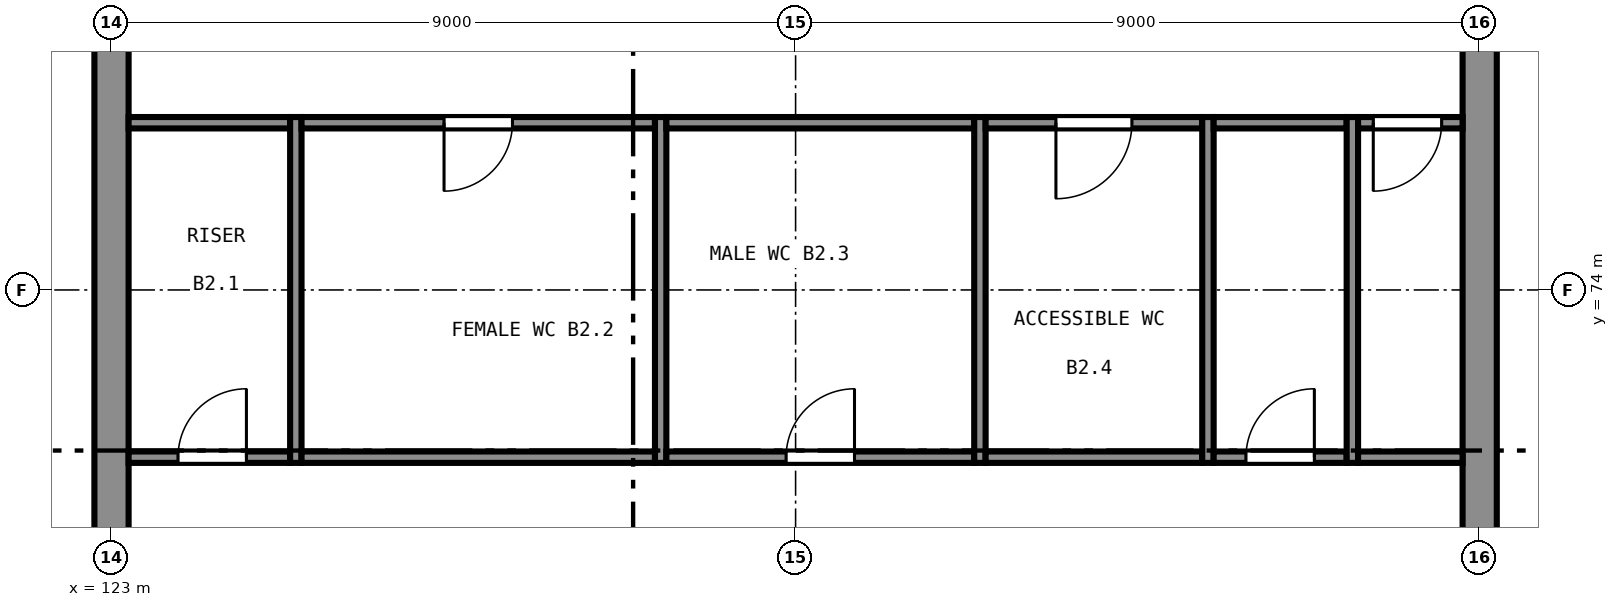
"""IFC4 building model, lengths in metres.
Left out: names, types, materials, properties, quantities, classifications, styles, units other than length and angle.
Written with IfcOpenShell. Run it as: python <this file> out.ifc"""

import sys

from ifc_helpers import new_model, si_unit, direction, frame, frame_2d, origin, place, context, subcontext, project, spatial, rectangle, extrude, element, fill, save


model = new_model("IFC4")
c1 = context("Model", 3, precision=1e-05, world=origin(), true_north=direction((0.0, 1.0)))
c2 = subcontext(c1, "Body", "Model", "MODEL_VIEW")
j1 = project(units=[si_unit("LENGTHUNIT", "METRE"), si_unit("PLANEANGLEUNIT", "RADIAN")], contexts=[c1])
p1 = place(None, origin())
s1 = spatial("IfcSite", under=j1, at=p1, CompositionType="ELEMENT")
p2 = place(p1, origin())
s2 = spatial("IfcBuilding", under=s1, at=p2, CompositionType="ELEMENT")
p3 = place(p2, frame((0.0, 0.0, -10.0)))
s3 = spatial("IfcBuildingStorey", under=s2, at=p3, CompositionType="ELEMENT", Elevation=-10.0)
p4 = place(p3, frame((141.0, 65.225, 0.0), z_axis=(0.0, 0.0, 1.0), x_axis=(0.0, 1.0, 0.0)))
e1 = element("IfcWall", 1, at=p4, inside=s3, PredefinedType="SHEAR", context=c2, shape_type="SweptSolid", body=[
    extrude(rectangle(XDim=17.55, YDim=0.45, at=frame_2d((8.775, 0.0))), origin(), (0.0, 0.0, 1.0), 5.0),
])
p5 = place(p4, frame((4.3, 0.0, 0.0)))
e2 = element("IfcOpeningElement", 2, at=p5, cuts=e1, PredefinedType="OPENING", context=c2, shape_type="SweptSolid", body=[
    extrude(rectangle(XDim=1.2, YDim=2.1, at=frame_2d((0.6, 1.05))), frame((0.0, 0.235, 0.0), z_axis=(0.0, -1.0, 0.0), x_axis=(1.0, 0.0, 0.0)), (0.0, 0.0, 1.0), 0.47),
])
p6 = place(p4, frame((12.05, 0.0, 0.0)))
e3 = element("IfcOpeningElement", 3, at=p6, cuts=e1, PredefinedType="OPENING", context=c2, shape_type="SweptSolid", body=[
    extrude(rectangle(XDim=1.2, YDim=2.1, at=frame_2d((0.6, 1.05))), frame((0.0, 0.235, 0.0), z_axis=(0.0, -1.0, 0.0), x_axis=(1.0, 0.0, 0.0)), (0.0, 0.0, 1.0), 0.47),
])
p7 = place(p3, frame((123.0, 82.775, 0.0), z_axis=(0.0, 0.0, 1.0), x_axis=(0.0, -1.0, 0.0)))
e4 = element("IfcWall", 4, at=p7, inside=s3, PredefinedType="SHEAR", context=c2, shape_type="SweptSolid", body=[
    extrude(rectangle(XDim=17.55, YDim=0.45, at=frame_2d((8.775, 0.0))), origin(), (0.0, 0.0, 1.0), 5.0),
])
p8 = place(p7, frame((12.05, 0.0, 0.0)))
e5 = element("IfcOpeningElement", 5, at=p8, cuts=e4, PredefinedType="OPENING", context=c2, shape_type="SweptSolid", body=[
    extrude(rectangle(XDim=1.2, YDim=2.1, at=frame_2d((0.6, 1.05))), frame((0.0, 0.235, 0.0), z_axis=(0.0, -1.0, 0.0), x_axis=(1.0, 0.0, 0.0)), (0.0, 0.0, 1.0), 0.47),
])
p9 = place(p7, frame((4.3, 0.0, 0.0)))
e6 = element("IfcOpeningElement", 6, at=p9, cuts=e4, PredefinedType="OPENING", context=c2, shape_type="SweptSolid", body=[
    extrude(rectangle(XDim=1.2, YDim=2.1, at=frame_2d((0.6, 1.05))), frame((0.0, 0.235, 0.0), z_axis=(0.0, -1.0, 0.0), x_axis=(1.0, 0.0, 0.0)), (0.0, 0.0, 1.0), 0.47),
])
p10 = place(p3, frame((125.425, 71.725, 0.0), z_axis=(0.0, 0.0, 1.0), x_axis=(0.0, 1.0, 0.0)))
e7 = element("IfcWall", 7, at=p10, inside=s3, PredefinedType="PARTITIONING", context=c2, shape_type="SweptSolid", body=[
    extrude(rectangle(XDim=4.55, YDim=0.15, at=frame_2d((2.275, 0.0))), origin(), (0.0, 0.0, 1.0), 4.7),
])
p11 = place(p3, frame((123.225, 71.8, 0.0), z_axis=(0.0, 0.0, 1.0), x_axis=(1.0, 0.0, 0.0)))
e8 = element("IfcWall", 8, at=p11, inside=s3, PredefinedType="PARTITIONING", context=c2, shape_type="SweptSolid", body=[
    extrude(rectangle(XDim=2.125, YDim=0.15, at=frame_2d((1.062, 0.0))), origin(), (0.0, 0.0, 1.0), 4.7),
])
p12 = place(p11, frame((0.65, 0.0, 0.0)))
e9 = element("IfcOpeningElement", 9, at=p12, cuts=e8, PredefinedType="OPENING", context=c2, shape_type="SweptSolid", body=[
    extrude(rectangle(XDim=0.9, YDim=2.1, at=frame_2d((0.45, 1.05))), frame((0.0, 0.085, 0.0), z_axis=(0.0, -1.0, 0.0), x_axis=(1.0, 0.0, 0.0)), (0.0, 0.0, 1.0), 0.17),
])
p13 = place(p3, frame((123.225, 76.2, 0.0), z_axis=(0.0, 0.0, 1.0), x_axis=(1.0, 0.0, 0.0)))
e10 = element("IfcWall", 10, at=p13, inside=s3, PredefinedType="PARTITIONING", context=c2, shape_type="SweptSolid", body=[
    extrude(rectangle(XDim=2.125, YDim=0.15, at=frame_2d((1.062, 0.0))), origin(), (0.0, 0.0, 1.0), 4.7),
])
p14 = place(p3, frame((130.225, 71.725, 0.0), z_axis=(0.0, 0.0, 1.0), x_axis=(0.0, 1.0, 0.0)))
e11 = element("IfcWall", 11, at=p14, inside=s3, PredefinedType="PARTITIONING", context=c2, shape_type="SweptSolid", body=[
    extrude(rectangle(XDim=4.55, YDim=0.15, at=frame_2d((2.275, 0.0))), origin(), (0.0, 0.0, 1.0), 4.7),
])
p15 = place(p3, frame((125.5, 71.8, 0.0), z_axis=(0.0, 0.0, 1.0), x_axis=(1.0, 0.0, 0.0)))
e12 = element("IfcWall", 12, at=p15, inside=s3, PredefinedType="PARTITIONING", context=c2, shape_type="SweptSolid", body=[
    extrude(rectangle(XDim=4.65, YDim=0.15, at=frame_2d((2.325, 0.0))), origin(), (0.0, 0.0, 1.0), 4.7),
])
p16 = place(p3, frame((125.5, 76.2, 0.0), z_axis=(0.0, 0.0, 1.0), x_axis=(1.0, 0.0, 0.0)))
e13 = element("IfcWall", 13, at=p16, inside=s3, PredefinedType="PARTITIONING", context=c2, shape_type="SweptSolid", body=[
    extrude(rectangle(XDim=4.65, YDim=0.15, at=frame_2d((2.325, 0.0))), origin(), (0.0, 0.0, 1.0), 4.7),
])
p17 = place(p16, frame((1.875, 0.0, 0.0)))
e14 = element("IfcOpeningElement", 14, at=p17, cuts=e13, PredefinedType="OPENING", context=c2, shape_type="SweptSolid", body=[
    extrude(rectangle(XDim=0.9, YDim=2.1, at=frame_2d((0.45, 1.05))), frame((0.0, 0.085, 0.0), z_axis=(0.0, -1.0, 0.0), x_axis=(1.0, 0.0, 0.0)), (0.0, 0.0, 1.0), 0.17),
])
p18 = place(p3, frame((134.425, 71.725, 0.0), z_axis=(0.0, 0.0, 1.0), x_axis=(0.0, 1.0, 0.0)))
e15 = element("IfcWall", 15, at=p18, inside=s3, PredefinedType="PARTITIONING", context=c2, shape_type="SweptSolid", body=[
    extrude(rectangle(XDim=4.55, YDim=0.15, at=frame_2d((2.275, 0.0))), origin(), (0.0, 0.0, 1.0), 4.7),
])
p19 = place(p3, frame((130.3, 71.8, 0.0), z_axis=(0.0, 0.0, 1.0), x_axis=(1.0, 0.0, 0.0)))
e16 = element("IfcWall", 16, at=p19, inside=s3, PredefinedType="PARTITIONING", context=c2, shape_type="SweptSolid", body=[
    extrude(rectangle(XDim=4.05, YDim=0.15, at=frame_2d((2.025, 0.0))), origin(), (0.0, 0.0, 1.0), 4.7),
])
p20 = place(p19, frame((1.575, 0.0, 0.0)))
e17 = element("IfcOpeningElement", 17, at=p20, cuts=e16, PredefinedType="OPENING", context=c2, shape_type="SweptSolid", body=[
    extrude(rectangle(XDim=0.9, YDim=2.1, at=frame_2d((0.45, 1.05))), frame((0.0, 0.085, 0.0), z_axis=(0.0, -1.0, 0.0), x_axis=(1.0, 0.0, 0.0)), (0.0, 0.0, 1.0), 0.17),
])
p21 = place(p3, frame((130.3, 76.2, 0.0), z_axis=(0.0, 0.0, 1.0), x_axis=(1.0, 0.0, 0.0)))
e18 = element("IfcWall", 18, at=p21, inside=s3, PredefinedType="PARTITIONING", context=c2, shape_type="SweptSolid", body=[
    extrude(rectangle(XDim=4.05, YDim=0.15, at=frame_2d((2.025, 0.0))), origin(), (0.0, 0.0, 1.0), 4.7),
])
p22 = place(p3, frame((137.425, 71.725, 0.0), z_axis=(0.0, 0.0, 1.0), x_axis=(0.0, 1.0, 0.0)))
e19 = element("IfcWall", 19, at=p22, inside=s3, PredefinedType="PARTITIONING", context=c2, shape_type="SweptSolid", body=[
    extrude(rectangle(XDim=4.55, YDim=0.15, at=frame_2d((2.275, 0.0))), origin(), (0.0, 0.0, 1.0), 4.7),
])
p23 = place(p3, frame((134.5, 71.8, 0.0), z_axis=(0.0, 0.0, 1.0), x_axis=(1.0, 0.0, 0.0)))
e20 = element("IfcWall", 20, at=p23, inside=s3, PredefinedType="PARTITIONING", context=c2, shape_type="SweptSolid", body=[
    extrude(rectangle(XDim=2.85, YDim=0.15, at=frame_2d((1.425, 0.0))), origin(), (0.0, 0.0, 1.0), 4.7),
])
p24 = place(p3, frame((134.5, 76.2, 0.0), z_axis=(0.0, 0.0, 1.0), x_axis=(1.0, 0.0, 0.0)))
e21 = element("IfcWall", 21, at=p24, inside=s3, PredefinedType="PARTITIONING", context=c2, shape_type="SweptSolid", body=[
    extrude(rectangle(XDim=2.85, YDim=0.15, at=frame_2d((1.425, 0.0))), origin(), (0.0, 0.0, 1.0), 4.7),
])
p25 = place(p24, frame((0.925, 0.0, 0.0)))
e22 = element("IfcOpeningElement", 22, at=p25, cuts=e21, PredefinedType="OPENING", context=c2, shape_type="SweptSolid", body=[
    extrude(rectangle(XDim=1.0, YDim=2.1, at=frame_2d((0.5, 1.05))), frame((0.0, 0.085, 0.0), z_axis=(0.0, -1.0, 0.0), x_axis=(1.0, 0.0, 0.0)), (0.0, 0.0, 1.0), 0.17),
])
p26 = place(p3, frame((139.325, 71.725, 0.0), z_axis=(0.0, 0.0, 1.0), x_axis=(0.0, 1.0, 0.0)))
e23 = element("IfcWall", 23, at=p26, inside=s3, PredefinedType="PARTITIONING", context=c2, shape_type="SweptSolid", body=[
    extrude(rectangle(XDim=4.55, YDim=0.15, at=frame_2d((2.275, 0.0))), origin(), (0.0, 0.0, 1.0), 4.7),
])
p27 = place(p3, frame((137.5, 71.8, 0.0), z_axis=(0.0, 0.0, 1.0), x_axis=(1.0, 0.0, 0.0)))
e24 = element("IfcWall", 24, at=p27, inside=s3, PredefinedType="PARTITIONING", context=c2, shape_type="SweptSolid", body=[
    extrude(rectangle(XDim=1.75, YDim=0.15, at=frame_2d((0.875, 0.0))), origin(), (0.0, 0.0, 1.0), 4.7),
])
p28 = place(p27, frame((0.425, 0.0, 0.0)))
e25 = element("IfcOpeningElement", 25, at=p28, cuts=e24, PredefinedType="OPENING", context=c2, shape_type="SweptSolid", body=[
    extrude(rectangle(XDim=0.9, YDim=2.1, at=frame_2d((0.45, 1.05))), frame((0.0, 0.085, 0.0), z_axis=(0.0, -1.0, 0.0), x_axis=(1.0, 0.0, 0.0)), (0.0, 0.0, 1.0), 0.17),
])
p29 = place(p3, frame((137.5, 76.2, 0.0), z_axis=(0.0, 0.0, 1.0), x_axis=(1.0, 0.0, 0.0)))
e26 = element("IfcWall", 26, at=p29, inside=s3, PredefinedType="PARTITIONING", context=c2, shape_type="SweptSolid", body=[
    extrude(rectangle(XDim=1.75, YDim=0.15, at=frame_2d((0.875, 0.0))), origin(), (0.0, 0.0, 1.0), 4.7),
])
p30 = place(p3, frame((139.4, 71.8, 0.0), z_axis=(0.0, 0.0, 1.0), x_axis=(1.0, 0.0, 0.0)))
e27 = element("IfcWall", 27, at=p30, inside=s3, PredefinedType="PARTITIONING", context=c2, shape_type="SweptSolid", body=[
    extrude(rectangle(XDim=1.375, YDim=0.15, at=frame_2d((0.688, 0.0))), origin(), (0.0, 0.0, 1.0), 4.7),
])
p31 = place(p3, frame((139.4, 76.2, 0.0), z_axis=(0.0, 0.0, 1.0), x_axis=(1.0, 0.0, 0.0)))
e28 = element("IfcWall", 28, at=p31, inside=s3, PredefinedType="PARTITIONING", context=c2, shape_type="SweptSolid", body=[
    extrude(rectangle(XDim=1.375, YDim=0.15, at=frame_2d((0.688, 0.0))), origin(), (0.0, 0.0, 1.0), 4.7),
])
p32 = place(p31, frame((0.2, 0.0, 0.0)))
e29 = element("IfcOpeningElement", 29, at=p32, cuts=e28, PredefinedType="OPENING", context=c2, shape_type="SweptSolid", body=[
    extrude(rectangle(XDim=0.9, YDim=2.1, at=frame_2d((0.45, 1.05))), frame((0.0, 0.085, 0.0), z_axis=(0.0, -1.0, 0.0), x_axis=(1.0, 0.0, 0.0)), (0.0, 0.0, 1.0), 0.17),
])
p33 = place(p12, origin())
e30 = element("IfcDoor", 30, at=p33, inside=s3, OperationType="SINGLE_SWING_LEFT", PredefinedType="DOOR", context=c2, shape_type="SweptSolid", body=[
    extrude(rectangle(XDim=0.9, YDim=2.1, at=frame_2d((0.45, 1.05))), frame((0.0, 0.025, 0.0), z_axis=(0.0, -1.0, 0.0), x_axis=(1.0, 0.0, 0.0)), (0.0, 0.0, 1.0), 0.05),
])
fill(e9, e30)
p34 = place(p17, frame((0.9, 0.0, 0.0), z_axis=(0.0, 0.0, 1.0), x_axis=(-1.0, 0.0, 0.0)))
e31 = element("IfcDoor", 31, at=p34, inside=s3, OperationType="SINGLE_SWING_LEFT", PredefinedType="DOOR", context=c2, shape_type="SweptSolid", body=[
    extrude(rectangle(XDim=0.9, YDim=2.1, at=frame_2d((0.45, 1.05))), frame((0.0, 0.025, 0.0), z_axis=(0.0, -1.0, 0.0), x_axis=(1.0, 0.0, 0.0)), (0.0, 0.0, 1.0), 0.05),
])
fill(e14, e31)
p35 = place(p20, origin())
e32 = element("IfcDoor", 32, at=p35, inside=s3, OperationType="SINGLE_SWING_LEFT", PredefinedType="DOOR", context=c2, shape_type="SweptSolid", body=[
    extrude(rectangle(XDim=0.9, YDim=2.1, at=frame_2d((0.45, 1.05))), frame((0.0, 0.025, 0.0), z_axis=(0.0, -1.0, 0.0), x_axis=(1.0, 0.0, 0.0)), (0.0, 0.0, 1.0), 0.05),
])
fill(e17, e32)
p36 = place(p25, frame((1.0, 0.0, 0.0), z_axis=(0.0, 0.0, 1.0), x_axis=(-1.0, 0.0, 0.0)))
e33 = element("IfcDoor", 33, at=p36, inside=s3, OperationType="SINGLE_SWING_LEFT", PredefinedType="DOOR", context=c2, shape_type="SweptSolid", body=[
    extrude(rectangle(XDim=1.0, YDim=2.1, at=frame_2d((0.5, 1.05))), frame((0.0, 0.025, 0.0), z_axis=(0.0, -1.0, 0.0), x_axis=(1.0, 0.0, 0.0)), (0.0, 0.0, 1.0), 0.05),
])
fill(e22, e33)
p37 = place(p28, origin())
e34 = element("IfcDoor", 34, at=p37, inside=s3, OperationType="SINGLE_SWING_LEFT", PredefinedType="DOOR", context=c2, shape_type="SweptSolid", body=[
    extrude(rectangle(XDim=0.9, YDim=2.1, at=frame_2d((0.45, 1.05))), frame((0.0, 0.025, 0.0), z_axis=(0.0, -1.0, 0.0), x_axis=(1.0, 0.0, 0.0)), (0.0, 0.0, 1.0), 0.05),
])
fill(e25, e34)
p38 = place(p32, frame((0.9, 0.0, 0.0), z_axis=(0.0, 0.0, 1.0), x_axis=(-1.0, 0.0, 0.0)))
e35 = element("IfcDoor", 35, at=p38, inside=s3, OperationType="SINGLE_SWING_LEFT", PredefinedType="DOOR", context=c2, shape_type="SweptSolid", body=[
    extrude(rectangle(XDim=0.9, YDim=2.1, at=frame_2d((0.45, 1.05))), frame((0.0, 0.025, 0.0), z_axis=(0.0, -1.0, 0.0), x_axis=(1.0, 0.0, 0.0)), (0.0, 0.0, 1.0), 0.05),
])
fill(e29, e35)
save(model, sys.argv[1])
